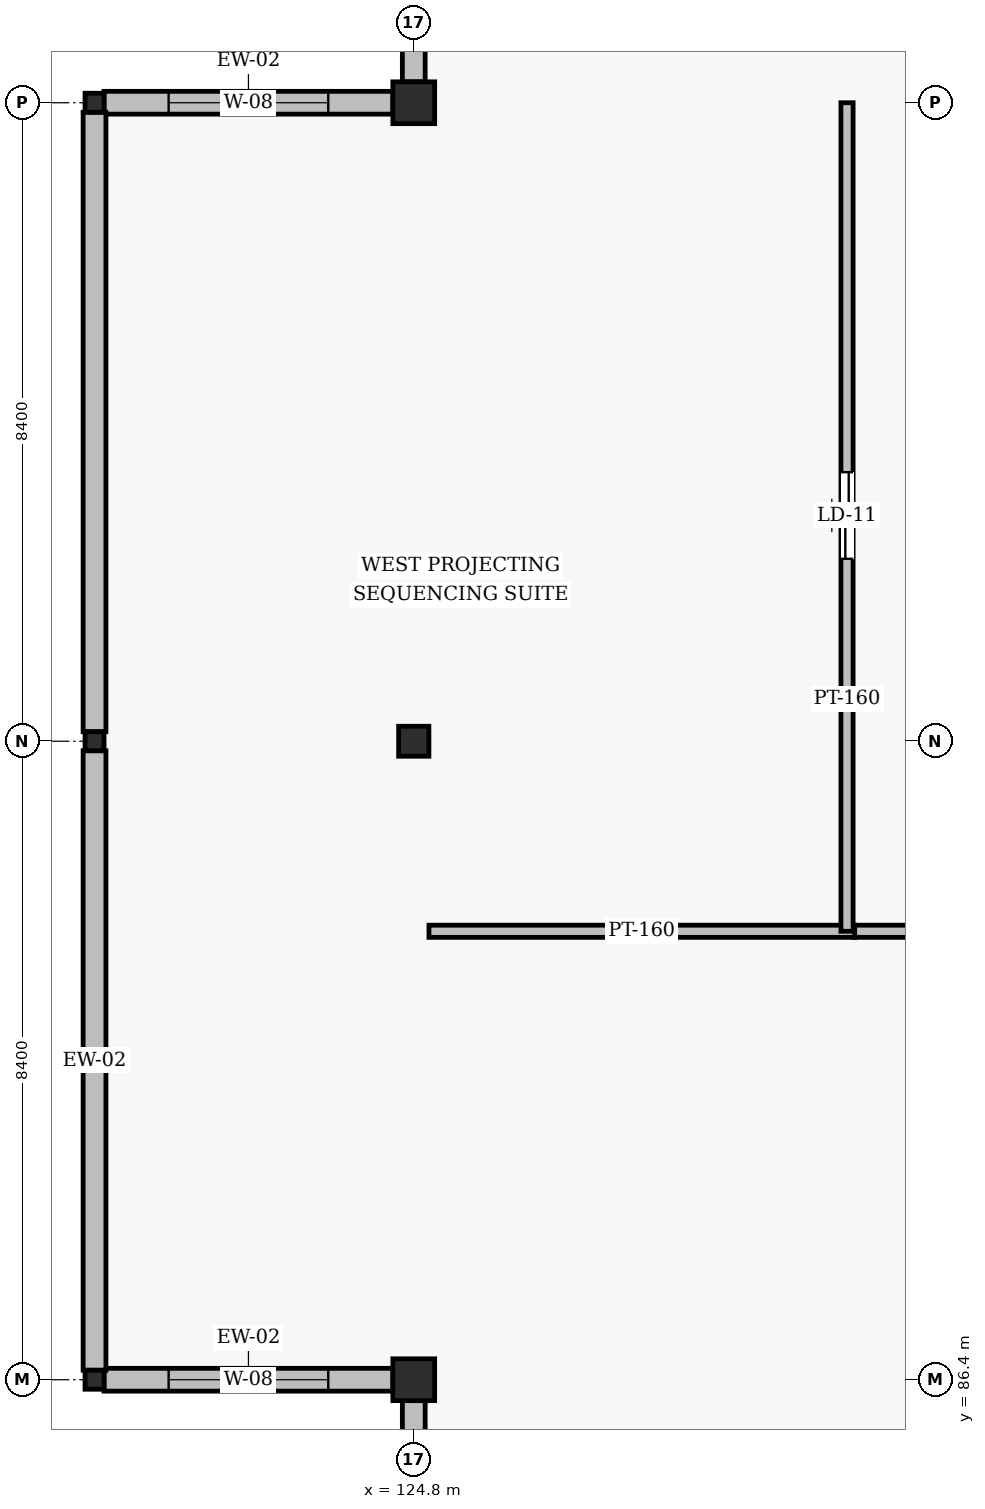
"""IFC4 building model, lengths in metres.
Left out: names, types, materials, properties, quantities, classifications, styles, units other than length and angle.
Written with IfcOpenShell. Run it as: python <this file> out.ifc"""

import sys

from ifc_helpers import new_model, si_unit, direction, frame, frame_2d, origin, origin_2d, place, context, subcontext, project, spatial, rectangle, hollow_rectangle, i_section, extrude, element, fill, save


model = new_model("IFC4")
c1 = context("Model", 3, precision=1e-05, world=origin(), true_north=direction((0.0, 1.0)))
c2 = subcontext(c1, "Body", "Model", "MODEL_VIEW")
j1 = project(units=[si_unit("LENGTHUNIT", "METRE"), si_unit("PLANEANGLEUNIT", "RADIAN")], contexts=[c1])
p1 = place(None, origin())
s1 = spatial("IfcSite", under=j1, at=p1, CompositionType="ELEMENT")
p2 = place(p1, origin())
s2 = spatial("IfcBuilding", under=s1, at=p2, CompositionType="ELEMENT")
p3 = place(p2, frame((0.0, 0.0, 24.6)))
s3 = spatial("IfcBuildingStorey", under=s2, at=p3, CompositionType="ELEMENT", Elevation=24.6)
for number, where, z_axis, x_axis in (
    (1, (120.6, 86.4, 0.0), (0.0, 0.0, 1.0), (1.0, 0.0, 0.0)),
    (2, (120.6, 94.8, 0.0), (0.0, 0.0, 1.0), (1.0, 0.0, 0.0)),
    (3, (120.6, 103.2, 0.0), (0.0, 0.0, 1.0), (1.0, 0.0, 0.0)),
):
    element("IfcColumn", number, at=place(p3, frame(where, z_axis=z_axis, x_axis=x_axis)), inside=s3, PredefinedType="COLUMN", context=c2, shape_type="SweptSolid", body=[
        extrude(i_section(OverallWidth=0.25, OverallDepth=0.25, WebThickness=0.009, FlangeThickness=0.014, FilletRadius=0.016, at=origin_2d()), origin(), (0.0, 0.0, 1.0), 3.6),
    ])
p4 = place(p3, frame((124.8, 86.4, 0.0), z_axis=(0.0, 0.0, 1.0), x_axis=(1.0, 0.0, 0.0)))
e4 = element("IfcColumn", 4, at=p4, inside=s3, PredefinedType="COLUMN", context=c2, shape_type="SweptSolid", body=[
    extrude(hollow_rectangle(XDim=0.55, YDim=0.55, WallThickness=0.022, InnerFilletRadius=0.022, OuterFilletRadius=0.044, at=origin_2d()), origin(), (0.0, 0.0, 1.0), 3.6),
])
p5 = place(p3, frame((124.8, 94.8, 0.0), z_axis=(0.0, 0.0, 1.0), x_axis=(1.0, 0.0, 0.0)))
e5 = element("IfcColumn", 5, at=p5, inside=s3, PredefinedType="COLUMN", context=c2, shape_type="SweptSolid", body=[
    extrude(i_section(OverallWidth=0.398, OverallDepth=0.394, WebThickness=0.011, FlangeThickness=0.018, FilletRadius=0.022, at=origin_2d()), origin(), (0.0, 0.0, 1.0), 3.6),
])
p6 = place(p3, frame((124.8, 103.2, 0.0), z_axis=(0.0, 0.0, 1.0), x_axis=(1.0, 0.0, 0.0)))
e6 = element("IfcColumn", 6, at=p6, inside=s3, PredefinedType="COLUMN", context=c2, shape_type="SweptSolid", body=[
    extrude(hollow_rectangle(XDim=0.55, YDim=0.55, WallThickness=0.022, InnerFilletRadius=0.022, OuterFilletRadius=0.044, at=origin_2d()), origin(), (0.0, 0.0, 1.0), 3.6),
])
p7 = place(p3, frame((120.725, 86.4, 0.0), z_axis=(0.0, 0.0, 1.0), x_axis=(1.0, 0.0, 0.0)))
e7 = element("IfcWall", 7, at=p7, inside=s3, PredefinedType="SOLIDWALL", context=c2, shape_type="SweptSolid", body=[
    extrude(rectangle(XDim=3.8, YDim=0.3, at=frame_2d((1.9, 0.0))), origin(), (0.0, 0.0, 1.0), 2.851),
])
p8 = place(p7, frame((0.85, 0.0, 0.85)))
e8 = element("IfcOpeningElement", 8, at=p8, cuts=e7, PredefinedType="OPENING", context=c2, shape_type="SweptSolid", body=[
    extrude(rectangle(XDim=2.1, YDim=1.7, at=frame_2d((1.05, 0.85))), frame((0.0, 0.16, 0.0), z_axis=(0.0, -1.0, 0.0), x_axis=(1.0, 0.0, 0.0)), (0.0, 0.0, 1.0), 0.32),
])
p9 = place(p3, frame((124.8, 86.125, 0.0), z_axis=(0.0, 0.0, 1.0), x_axis=(0.0, -1.0, 0.0)))
e9 = element("IfcWall", 9, at=p9, inside=s3, PredefinedType="SOLIDWALL", context=c2, shape_type="SweptSolid", body=[
    extrude(rectangle(XDim=7.85, YDim=0.3, at=frame_2d((3.925, 0.0))), origin(), (0.0, 0.0, 1.0), 2.845),
])
p10 = place(p3, frame((124.8, 114.925, 0.0), z_axis=(0.0, 0.0, 1.0), x_axis=(0.0, -1.0, 0.0)))
e10 = element("IfcWall", 10, at=p10, inside=s3, PredefinedType="SOLIDWALL", context=c2, shape_type="SweptSolid", body=[
    extrude(rectangle(XDim=11.45, YDim=0.3, at=frame_2d((5.725, 0.0))), origin(), (0.0, 0.0, 1.0), 2.553),
])
p11 = place(p3, frame((124.525, 103.2, 0.0), z_axis=(0.0, 0.0, 1.0), x_axis=(-1.0, 0.0, 0.0)))
e11 = element("IfcWall", 11, at=p11, inside=s3, PredefinedType="SOLIDWALL", context=c2, shape_type="SweptSolid", body=[
    extrude(rectangle(XDim=3.8, YDim=0.3, at=frame_2d((1.9, 0.0))), origin(), (0.0, 0.0, 1.0), 2.851),
])
p12 = place(p11, frame((0.85, 0.0, 0.85)))
e12 = element("IfcOpeningElement", 12, at=p12, cuts=e11, PredefinedType="OPENING", context=c2, shape_type="SweptSolid", body=[
    extrude(rectangle(XDim=2.1, YDim=1.7, at=frame_2d((1.05, 0.85))), frame((0.0, 0.16, 0.0), z_axis=(0.0, -1.0, 0.0), x_axis=(1.0, 0.0, 0.0)), (0.0, 0.0, 1.0), 0.32),
])
p13 = place(p3, frame((120.6, 103.075, 0.0), z_axis=(0.0, 0.0, 1.0), x_axis=(0.0, -1.0, 0.0)))
e13 = element("IfcWall", 13, at=p13, inside=s3, PredefinedType="SOLIDWALL", context=c2, shape_type="SweptSolid", body=[
    extrude(rectangle(XDim=8.15, YDim=0.3, at=frame_2d((4.075, 0.0))), origin(), (0.0, 0.0, 1.0), 2.845),
])
p14 = place(p3, frame((120.6, 94.675, 0.0), z_axis=(0.0, 0.0, 1.0), x_axis=(0.0, -1.0, 0.0)))
e14 = element("IfcWall", 14, at=p14, inside=s3, PredefinedType="SOLIDWALL", context=c2, shape_type="SweptSolid", body=[
    extrude(rectangle(XDim=8.15, YDim=0.3, at=frame_2d((4.075, 0.0))), origin(), (0.0, 0.0, 1.0), 2.845),
])
p15 = place(p3, frame((130.6, 92.3, 0.0), z_axis=(0.0, 0.0, 1.0), x_axis=(1.0, 0.0, 0.0)))
e15 = element("IfcWall", 15, at=p15, inside=s3, PredefinedType="PARTITIONING", context=c2, shape_type="SweptSolid", body=[
    extrude(rectangle(XDim=15.4, YDim=0.16, at=frame_2d((7.7, 0.0))), origin(), (0.0, 0.0, 1.0), 2.845),
])
p16 = place(p15, frame((7.1, 0.0, 0.0)))
e16 = element("IfcOpeningElement", 16, at=p16, cuts=e15, PredefinedType="OPENING", context=c2, shape_type="SweptSolid", body=[
    extrude(rectangle(XDim=1.25, YDim=2.12, at=frame_2d((0.625, 1.06))), frame((0.0, 0.09, 0.0), z_axis=(0.0, -1.0, 0.0), x_axis=(1.0, 0.0, 0.0)), (0.0, 0.0, 1.0), 0.18),
])
p17 = place(p3, frame((125.0, 92.3, 0.0), z_axis=(0.0, 0.0, 1.0), x_axis=(1.0, 0.0, 0.0)))
e17 = element("IfcWall", 17, at=p17, inside=s3, PredefinedType="PARTITIONING", context=c2, shape_type="SweptSolid", body=[
    extrude(rectangle(XDim=5.6, YDim=0.16, at=frame_2d((2.8, 0.0))), origin(), (0.0, 0.0, 1.0), 3.345),
])
p18 = place(p3, frame((130.5, 92.3, 0.0), z_axis=(0.0, 0.0, 1.0), x_axis=(0.0, 1.0, 0.0)))
e18 = element("IfcWall", 18, at=p18, inside=s3, PredefinedType="PARTITIONING", context=c2, shape_type="SweptSolid", body=[
    extrude(rectangle(XDim=10.9, YDim=0.16, at=frame_2d((5.45, 0.0))), origin(), (0.0, 0.0, 1.0), 2.845),
])
p19 = place(p18, frame((4.9, 0.0, 0.0)))
e19 = element("IfcOpeningElement", 19, at=p19, cuts=e18, PredefinedType="OPENING", context=c2, shape_type="SweptSolid", body=[
    extrude(rectangle(XDim=1.14, YDim=2.12, at=frame_2d((0.57, 1.06))), frame((0.0, 0.09, 0.0), z_axis=(0.0, -1.0, 0.0), x_axis=(1.0, 0.0, 0.0)), (0.0, 0.0, 1.0), 0.18),
])
p20 = place(p8, origin())
e20 = element("IfcWindow", 20, at=p20, inside=s3, PartitioningType="SINGLE_PANEL", PredefinedType="WINDOW", context=c2, shape_type="SweptSolid", body=[
    extrude(rectangle(XDim=2.1, YDim=1.7, at=frame_2d((1.05, 0.85))), frame((0.0, 0.03, 0.0), z_axis=(0.0, -1.0, 0.0), x_axis=(1.0, 0.0, 0.0)), (0.0, 0.0, 1.0), 0.06),
])
fill(e8, e20)
p21 = place(p12, origin())
e21 = element("IfcWindow", 21, at=p21, inside=s3, PartitioningType="SINGLE_PANEL", PredefinedType="WINDOW", context=c2, shape_type="SweptSolid", body=[
    extrude(rectangle(XDim=2.1, YDim=1.7, at=frame_2d((1.05, 0.85))), frame((0.0, 0.03, 0.0), z_axis=(0.0, -1.0, 0.0), x_axis=(1.0, 0.0, 0.0)), (0.0, 0.0, 1.0), 0.06),
])
fill(e12, e21)
p22 = place(p19, origin())
e22 = element("IfcDoor", 22, at=p22, inside=s3, OperationType="SINGLE_SWING_RIGHT", PredefinedType="DOOR", context=c2, shape_type="SweptSolid", body=[
    extrude(rectangle(XDim=1.14, YDim=2.12, at=frame_2d((0.57, 1.06))), frame((0.0, 0.025, 0.0), z_axis=(0.0, -1.0, 0.0), x_axis=(1.0, 0.0, 0.0)), (0.0, 0.0, 1.0), 0.05),
])
fill(e19, e22)
save(model, sys.argv[1])
